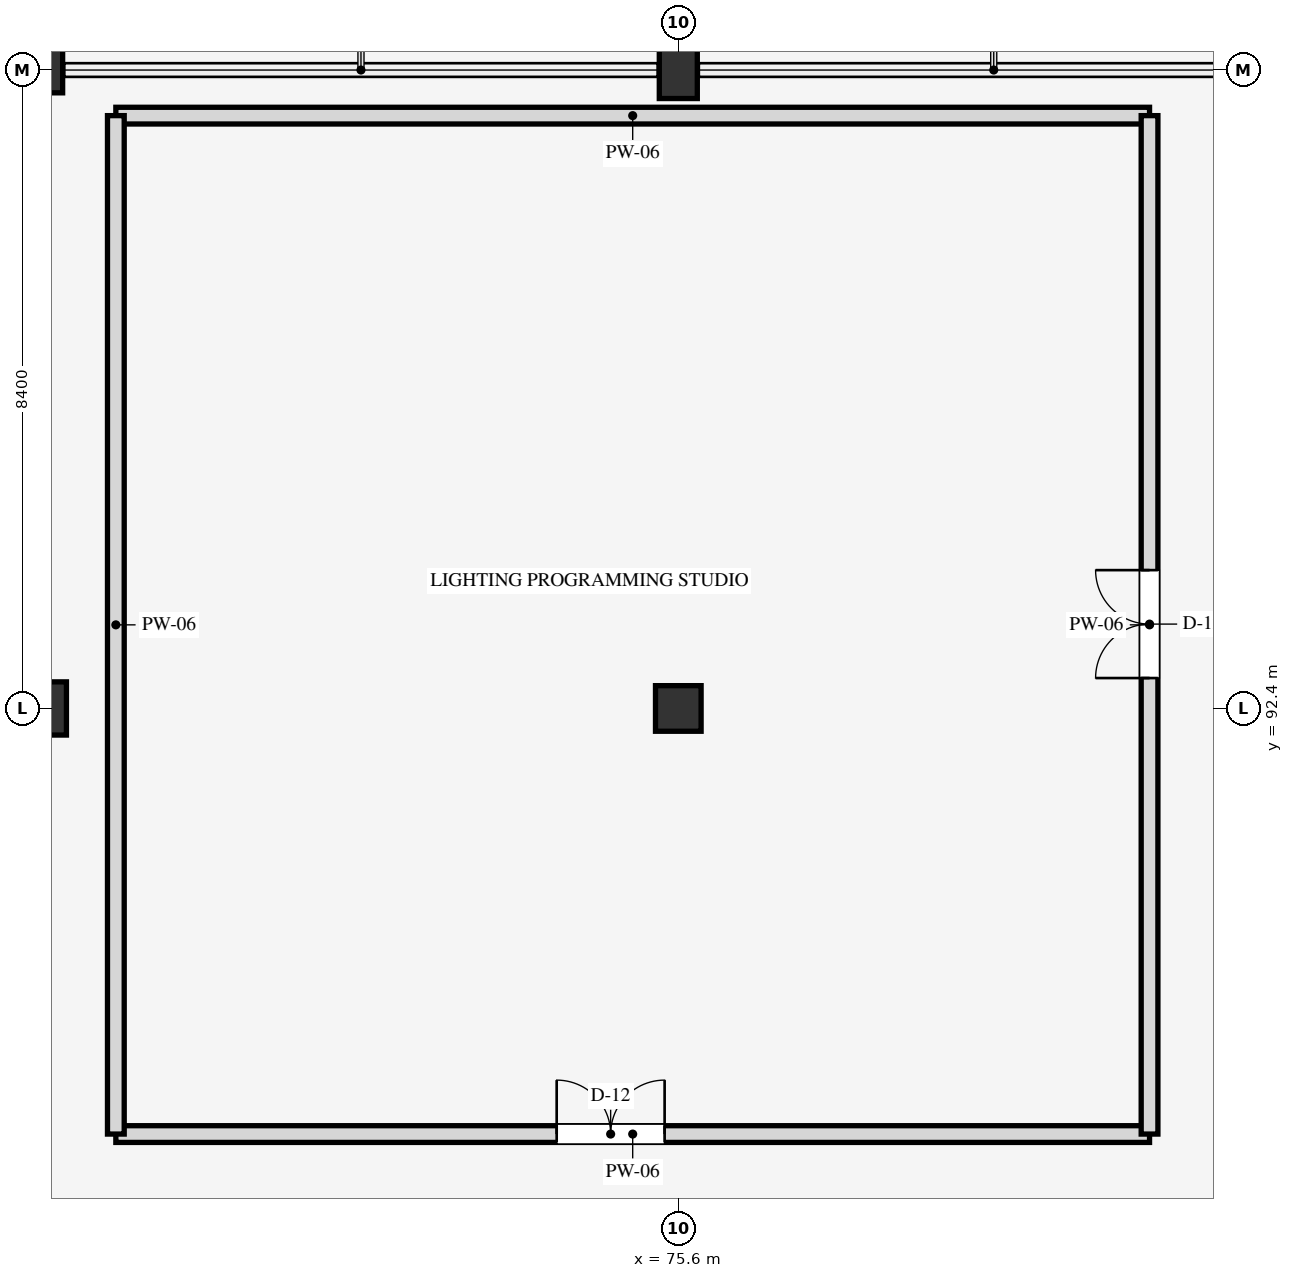
"""IFC4 building model, lengths in metres.
Left out: names, types, materials, properties, quantities, classifications, styles, units other than length and angle.
Written with IfcOpenShell. Run it as: python <this file> out.ifc"""

import sys

from ifc_helpers import new_model, si_unit, direction, frame, frame_2d, origin, origin_2d, place, context, subcontext, project, spatial, rectangle, extrude, element, fill, save


model = new_model("IFC4")
c1 = context("Model", 3, precision=1e-05, world=origin(), true_north=direction((0.0, 1.0)))
c2 = subcontext(c1, "Body", "Model", "MODEL_VIEW")
j1 = project(units=[si_unit("LENGTHUNIT", "METRE"), si_unit("PLANEANGLEUNIT", "RADIAN")], contexts=[c1])
p1 = place(None, origin())
s1 = spatial("IfcSite", under=j1, at=p1, CompositionType="ELEMENT")
p2 = place(p1, origin())
s2 = spatial("IfcBuilding", under=s1, at=p2, CompositionType="ELEMENT")
p3 = place(p2, frame((0.0, 0.0, 9.9)))
s3 = spatial("IfcBuildingStorey", under=s2, at=p3, CompositionType="ELEMENT", Elevation=9.9)
p4 = place(p3, frame((67.2, 92.4, 0.0), z_axis=(0.0, 0.0, 1.0), x_axis=(1.0, 0.0, 0.0)))
e1 = element("IfcColumn", 1, at=p4, inside=s3, PredefinedType="COLUMN", context=c2, shape_type="SweptSolid", body=[
    extrude(rectangle(XDim=0.7, YDim=0.7, at=origin_2d()), origin(), (0.0, 0.0, 1.0), 4.5),
])
for number, where, z_axis, x_axis in (
    (2, (67.2, 100.8, 0.0), (0.0, 0.0, 1.0), (1.0, 0.0, 0.0)),
    (3, (75.6, 92.4, 0.0), (0.0, 0.0, 1.0), (1.0, 0.0, 0.0)),
):
    element("IfcColumn", number, at=place(p3, frame(where, z_axis=z_axis, x_axis=x_axis)), inside=s3, PredefinedType="COLUMN", context=c2, shape_type="SweptSolid", body=[
        extrude(rectangle(XDim=0.6, YDim=0.6, at=origin_2d()), origin(), (0.0, 0.0, 1.0), 4.5),
    ])
p5 = place(p3, frame((75.6, 100.8, 0.0), z_axis=(0.0, 0.0, 1.0), x_axis=(1.0, 0.0, 0.0)))
e4 = element("IfcColumn", 4, at=p5, inside=s3, PredefinedType="PILASTER", context=c2, shape_type="SweptSolid", body=[
    extrude(rectangle(XDim=0.5, YDim=0.75, at=origin_2d()), origin(), (0.0, 0.0, 1.0), 4.5),
])
p6 = place(p3, frame((68.2, 86.8, 0.0), z_axis=(0.0, 0.0, 1.0), x_axis=(1.0, 0.0, 0.0)))
e5 = element("IfcWall", 5, at=p6, inside=s3, PredefinedType="PARTITIONING", context=c2, shape_type="SweptSolid", body=[
    extrude(rectangle(XDim=13.6, YDim=0.22, at=frame_2d((6.8, 0.0))), origin(), (0.0, 0.0, 1.0), 3.54),
])
p7 = place(p6, frame((5.8, 0.0, 0.0)))
e6 = element("IfcOpeningElement", 6, at=p7, cuts=e5, PredefinedType="OPENING", context=c2, shape_type="SweptSolid", body=[
    extrude(rectangle(XDim=1.42, YDim=2.18, at=frame_2d((0.71, 1.09))), frame((0.0, 0.12, 0.0), z_axis=(0.0, -1.0, 0.0), x_axis=(1.0, 0.0, 0.0)), (0.0, 0.0, 1.0), 0.24),
])
p8 = place(p3, frame((68.2, 100.2, 0.0), z_axis=(0.0, 0.0, 1.0), x_axis=(1.0, 0.0, 0.0)))
e7 = element("IfcWall", 7, at=p8, inside=s3, PredefinedType="PARTITIONING", context=c2, shape_type="SweptSolid", body=[
    extrude(rectangle(XDim=13.6, YDim=0.22, at=frame_2d((6.8, 0.0))), origin(), (0.0, 0.0, 1.0), 3.54),
])
p9 = place(p3, frame((68.2, 86.8, 0.0), z_axis=(0.0, 0.0, 1.0), x_axis=(0.0, 1.0, 0.0)))
e8 = element("IfcWall", 8, at=p9, inside=s3, PredefinedType="PARTITIONING", context=c2, shape_type="SweptSolid", body=[
    extrude(rectangle(XDim=13.4, YDim=0.22, at=frame_2d((6.7, 0.0))), origin(), (0.0, 0.0, 1.0), 3.54),
])
p10 = place(p3, frame((81.8, 86.8, 0.0), z_axis=(0.0, 0.0, 1.0), x_axis=(0.0, 1.0, 0.0)))
e9 = element("IfcWall", 9, at=p10, inside=s3, PredefinedType="PARTITIONING", context=c2, shape_type="SweptSolid", body=[
    extrude(rectangle(XDim=13.4, YDim=0.22, at=frame_2d((6.7, 0.0))), origin(), (0.0, 0.0, 1.0), 3.54),
])
p11 = place(p10, frame((6.0, 0.0, 0.0)))
e10 = element("IfcOpeningElement", 10, at=p11, cuts=e9, PredefinedType="OPENING", context=c2, shape_type="SweptSolid", body=[
    extrude(rectangle(XDim=1.42, YDim=2.18, at=frame_2d((0.71, 1.09))), frame((0.0, 0.12, 0.0), z_axis=(0.0, -1.0, 0.0), x_axis=(1.0, 0.0, 0.0)), (0.0, 0.0, 1.0), 0.24),
])
p12 = place(p7, origin())
e11 = element("IfcDoor", 11, at=p12, inside=s3, OperationType="DOUBLE_DOOR_SINGLE_SWING", PredefinedType="DOOR", context=c2, shape_type="SweptSolid", body=[
    extrude(rectangle(XDim=1.42, YDim=2.18, at=frame_2d((0.71, 1.09))), frame((0.0, 0.025, 0.0), z_axis=(0.0, -1.0, 0.0), x_axis=(1.0, 0.0, 0.0)), (0.0, 0.0, 1.0), 0.05),
])
fill(e6, e11)
p13 = place(p11, origin())
e12 = element("IfcDoor", 12, at=p13, inside=s3, OperationType="DOUBLE_DOOR_SINGLE_SWING", PredefinedType="DOOR", context=c2, shape_type="SweptSolid", body=[
    extrude(rectangle(XDim=1.42, YDim=2.18, at=frame_2d((0.71, 1.09))), frame((0.0, 0.025, 0.0), z_axis=(0.0, -1.0, 0.0), x_axis=(1.0, 0.0, 0.0)), (0.0, 0.0, 1.0), 0.05),
])
fill(e10, e12)
save(model, sys.argv[1])
